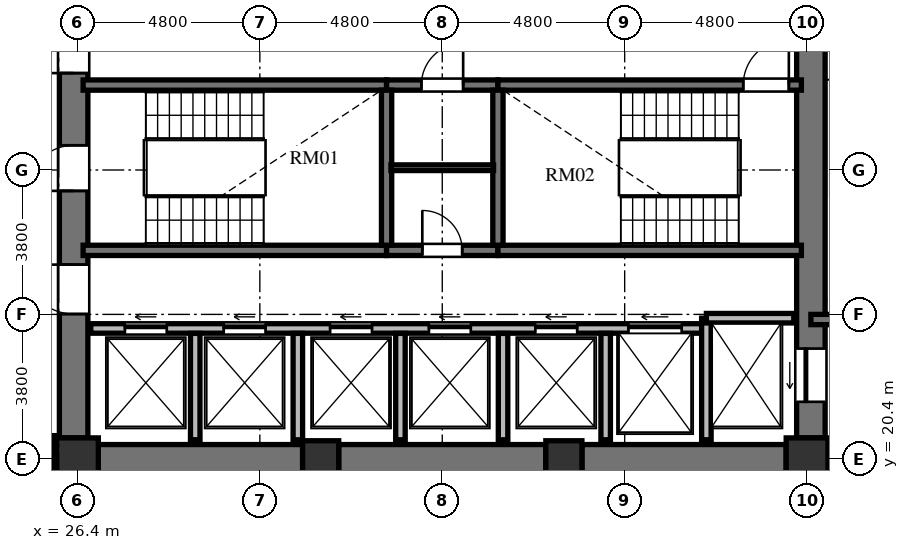
"""IFC4 building model, lengths in metres.
Left out: names, types, materials, properties, quantities, classifications, styles, units other than length and angle.
Written with IfcOpenShell. Run it as: python <this file> out.ifc"""

import sys

from ifc_helpers import new_model, si_unit, direction, frame, frame_2d, origin, origin_2d, place, context, subcontext, project, spatial, rectangle, extrude, element, fill, save


model = new_model("IFC4")
c1 = context("Model", 3, precision=1e-05, world=origin(), true_north=direction((0.0, 1.0)))
c2 = subcontext(c1, "Body", "Model", "MODEL_VIEW")
j1 = project(units=[si_unit("LENGTHUNIT", "METRE"), si_unit("PLANEANGLEUNIT", "RADIAN")], contexts=[c1])
p1 = place(None, origin())
s1 = spatial("IfcSite", under=j1, at=p1, CompositionType="ELEMENT")
p2 = place(p1, origin())
s2 = spatial("IfcBuilding", under=s1, at=p2, CompositionType="ELEMENT")
p3 = place(p2, frame((0.0, 0.0, 129.168)))
s3 = spatial("IfcBuildingStorey", under=s2, at=p3, CompositionType="ELEMENT", Elevation=129.168)
p4 = place(p3, frame((26.4, 20.4, 0.0), z_axis=(0.0, 0.0, 1.0), x_axis=(1.0, 0.0, 0.0)))
e1 = element("IfcColumn", 1, at=p4, inside=s3, PredefinedType="COLUMN", context=c2, shape_type="SweptSolid", body=[
    extrude(rectangle(XDim=1.1, YDim=1.1, at=origin_2d()), origin(), (0.0, 0.0, 1.0), 3.648),
])
for number, where, z_axis, x_axis in (
    (2, (32.8, 20.4, 0.0), (0.0, 0.0, 1.0), (1.0, 0.0, 0.0)),
    (3, (39.2, 20.4, 0.0), (0.0, 0.0, 1.0), (1.0, 0.0, 0.0)),
):
    element("IfcColumn", number, at=place(p3, frame(where, z_axis=z_axis, x_axis=x_axis)), inside=s3, PredefinedType="COLUMN", context=c2, shape_type="SweptSolid", body=[
        extrude(rectangle(XDim=0.95, YDim=0.95, at=origin_2d()), origin(), (0.0, 0.0, 1.0), 3.648),
    ])
p5 = place(p3, frame((45.6, 20.4, 0.0), z_axis=(0.0, 0.0, 1.0), x_axis=(1.0, 0.0, 0.0)))
e4 = element("IfcColumn", 4, at=p5, inside=s3, PredefinedType="COLUMN", context=c2, shape_type="SweptSolid", body=[
    extrude(rectangle(XDim=1.1, YDim=1.1, at=origin_2d()), origin(), (0.0, 0.0, 1.0), 3.648),
])
p6 = place(p3, frame((26.3, 20.95, 0.0), z_axis=(0.0, 0.0, 1.0), x_axis=(0.0, 1.0, 0.0)))
e5 = element("IfcWall", 5, at=p6, inside=s3, PredefinedType="SHEAR", context=c2, shape_type="SweptSolid", body=[
    extrude(rectangle(XDim=14.1, YDim=0.75, at=frame_2d((7.05, 0.0))), origin(), (0.0, 0.0, 1.0), 3.648),
])
p7 = place(p6, frame((6.5, 0.0, 0.0)))
e6 = element("IfcOpeningElement", 6, at=p7, cuts=e5, PredefinedType="OPENING", context=c2, shape_type="SweptSolid", body=[
    extrude(rectangle(XDim=1.2, YDim=2.15, at=frame_2d((0.6, 1.075))), frame((0.0, 0.385, 0.0), z_axis=(0.0, -1.0, 0.0), x_axis=(1.0, 0.0, 0.0)), (0.0, 0.0, 1.0), 0.77),
])
p8 = place(p6, frame((9.6, 0.0, 0.0)))
e7 = element("IfcOpeningElement", 7, at=p8, cuts=e5, PredefinedType="OPENING", context=c2, shape_type="SweptSolid", body=[
    extrude(rectangle(XDim=1.3, YDim=2.2, at=frame_2d((0.65, 1.1))), frame((0.0, 0.385, 0.0), z_axis=(0.0, -1.0, 0.0), x_axis=(1.0, 0.0, 0.0)), (0.0, 0.0, 1.0), 0.77),
])
p9 = place(p6, frame((3.26, 0.0, 0.0)))
e8 = element("IfcOpeningElement", 8, at=p9, cuts=e5, PredefinedType="OPENING", context=c2, shape_type="SweptSolid", body=[
    extrude(rectangle(XDim=1.3, YDim=2.2, at=frame_2d((0.65, 1.1))), frame((0.0, 0.385, 0.0), z_axis=(0.0, -1.0, 0.0), x_axis=(1.0, 0.0, 0.0)), (0.0, 0.0, 1.0), 0.77),
])
p10 = place(p3, frame((45.7, 20.95, 0.0), z_axis=(0.0, 0.0, 1.0), x_axis=(0.0, 1.0, 0.0)))
e9 = element("IfcWall", 9, at=p10, inside=s3, PredefinedType="SHEAR", context=c2, shape_type="SweptSolid", body=[
    extrude(rectangle(XDim=14.1, YDim=0.75, at=frame_2d((7.05, 0.0))), origin(), (0.0, 0.0, 1.0), 3.648),
])
p11 = place(p10, frame((11.75, 0.0, 0.0)))
e10 = element("IfcOpeningElement", 10, at=p11, cuts=e9, PredefinedType="OPENING", context=c2, shape_type="SweptSolid", body=[
    extrude(rectangle(XDim=1.4, YDim=2.3, at=frame_2d((0.7, 1.15))), frame((0.0, 0.385, 0.0), z_axis=(0.0, -1.0, 0.0), x_axis=(1.0, 0.0, 0.0)), (0.0, 0.0, 1.0), 0.77),
])
p12 = place(p10, frame((0.95, 0.0, 0.0)))
e11 = element("IfcOpeningElement", 11, at=p12, cuts=e9, PredefinedType="OPENING", context=c2, shape_type="SweptSolid", body=[
    extrude(rectangle(XDim=1.4, YDim=2.3, at=frame_2d((0.7, 1.15))), frame((0.0, 0.385, 0.0), z_axis=(0.0, -1.0, 0.0), x_axis=(1.0, 0.0, 0.0)), (0.0, 0.0, 1.0), 0.77),
])
p13 = place(p3, frame((26.95, 20.4, 0.0), z_axis=(0.0, 0.0, 1.0), x_axis=(1.0, 0.0, 0.0)))
e12 = element("IfcWall", 12, at=p13, inside=s3, PredefinedType="SHEAR", context=c2, shape_type="SweptSolid", body=[
    extrude(rectangle(XDim=5.375, YDim=0.75, at=frame_2d((2.688, 0.0))), origin(), (0.0, 0.0, 1.0), 3.648),
])
p14 = place(p3, frame((33.275, 20.4, 0.0), z_axis=(0.0, 0.0, 1.0), x_axis=(1.0, 0.0, 0.0)))
e13 = element("IfcWall", 13, at=p14, inside=s3, PredefinedType="SHEAR", context=c2, shape_type="SweptSolid", body=[
    extrude(rectangle(XDim=5.45, YDim=0.75, at=frame_2d((2.725, 0.0))), origin(), (0.0, 0.0, 1.0), 3.648),
])
p15 = place(p3, frame((39.675, 20.4, 0.0), z_axis=(0.0, 0.0, 1.0), x_axis=(1.0, 0.0, 0.0)))
e14 = element("IfcWall", 14, at=p15, inside=s3, PredefinedType="SHEAR", context=c2, shape_type="SweptSolid", body=[
    extrude(rectangle(XDim=5.375, YDim=0.75, at=frame_2d((2.688, 0.0))), origin(), (0.0, 0.0, 1.0), 3.648),
])
p16 = place(p3, frame((26.55, 30.235, 0.0), z_axis=(0.0, 0.0, 1.0), x_axis=(1.0, 0.0, 0.0)))
e15 = element("IfcWall", 15, at=p16, inside=s3, PredefinedType="SHEAR", context=c2, shape_type="SweptSolid", body=[
    extrude(rectangle(XDim=7.985, YDim=0.27, at=frame_2d((3.992, 0.0))), origin(), (0.0, 0.0, 1.0), 3.648),
])
p17 = place(p3, frame((34.535, 30.235, 0.0), z_axis=(0.0, 0.0, 1.0), x_axis=(1.0, 0.0, 0.0)))
e16 = element("IfcWall", 16, at=p17, inside=s3, PredefinedType="SHEAR", context=c2, shape_type="SweptSolid", body=[
    extrude(rectangle(XDim=2.93, YDim=0.27, at=frame_2d((1.465, 0.0))), origin(), (0.0, 0.0, 1.0), 3.648),
])
p18 = place(p17, frame((0.915, 0.0, 0.0)))
e17 = element("IfcOpeningElement", 17, at=p18, cuts=e16, PredefinedType="OPENING", context=c2, shape_type="SweptSolid", body=[
    extrude(rectangle(XDim=1.1, YDim=2.15, at=frame_2d((0.55, 1.075))), frame((0.0, 0.145, 0.0), z_axis=(0.0, -1.0, 0.0), x_axis=(1.0, 0.0, 0.0)), (0.0, 0.0, 1.0), 0.29),
])
p19 = place(p3, frame((37.465, 30.235, 0.0), z_axis=(0.0, 0.0, 1.0), x_axis=(1.0, 0.0, 0.0)))
e18 = element("IfcWall", 18, at=p19, inside=s3, PredefinedType="SHEAR", context=c2, shape_type="SweptSolid", body=[
    extrude(rectangle(XDim=7.985, YDim=0.27, at=frame_2d((3.992, 0.0))), origin(), (0.0, 0.0, 1.0), 3.648),
])
p20 = place(p19, frame((6.455, 0.0, 0.0)))
e19 = element("IfcOpeningElement", 19, at=p20, cuts=e18, PredefinedType="OPENING", context=c2, shape_type="SweptSolid", body=[
    extrude(rectangle(XDim=1.2, YDim=2.15, at=frame_2d((0.6, 1.075))), frame((0.0, 0.145, 0.0), z_axis=(0.0, -1.0, 0.0), x_axis=(1.0, 0.0, 0.0)), (0.0, 0.0, 1.0), 0.29),
])
p21 = place(p3, frame((26.55, 25.885, 0.0), z_axis=(0.0, 0.0, 1.0), x_axis=(1.0, 0.0, 0.0)))
e20 = element("IfcWall", 20, at=p21, inside=s3, PredefinedType="SHEAR", context=c2, shape_type="SweptSolid", body=[
    extrude(rectangle(XDim=7.985, YDim=0.27, at=frame_2d((3.992, 0.0))), origin(), (0.0, 0.0, 1.0), 3.648),
])
p22 = place(p3, frame((34.535, 25.885, 0.0), z_axis=(0.0, 0.0, 1.0), x_axis=(1.0, 0.0, 0.0)))
e21 = element("IfcWall", 21, at=p22, inside=s3, PredefinedType="SHEAR", context=c2, shape_type="SweptSolid", body=[
    extrude(rectangle(XDim=2.93, YDim=0.27, at=frame_2d((1.465, 0.0))), origin(), (0.0, 0.0, 1.0), 3.648),
])
p23 = place(p22, frame((0.94, 0.0, 0.0)))
e22 = element("IfcOpeningElement", 22, at=p23, cuts=e21, PredefinedType="OPENING", context=c2, shape_type="SweptSolid", body=[
    extrude(rectangle(XDim=1.05, YDim=2.15, at=frame_2d((0.525, 1.075))), frame((0.0, 0.145, 0.0), z_axis=(0.0, -1.0, 0.0), x_axis=(1.0, 0.0, 0.0)), (0.0, 0.0, 1.0), 0.29),
])
p24 = place(p3, frame((37.465, 25.885, 0.0), z_axis=(0.0, 0.0, 1.0), x_axis=(1.0, 0.0, 0.0)))
e23 = element("IfcWall", 23, at=p24, inside=s3, PredefinedType="SHEAR", context=c2, shape_type="SweptSolid", body=[
    extrude(rectangle(XDim=7.985, YDim=0.27, at=frame_2d((3.992, 0.0))), origin(), (0.0, 0.0, 1.0), 3.648),
])
for number, where, z_axis, x_axis in (
    (24, (34.535, 26.02, 0.0), (0.0, 0.0, 1.0), (0.0, 1.0, 0.0)),
    (25, (37.465, 26.02, 0.0), (0.0, 0.0, 1.0), (0.0, 1.0, 0.0)),
):
    element("IfcWall", number, at=place(p3, frame(where, z_axis=z_axis, x_axis=x_axis)), inside=s3, PredefinedType="SHEAR", context=c2, shape_type="SweptSolid", body=[
        extrude(rectangle(XDim=4.08, YDim=0.27, at=frame_2d((2.04, 0.0))), origin(), (0.0, 0.0, 1.0), 3.648),
    ])
p25 = place(p3, frame((34.65, 28.06, 0.0), z_axis=(0.0, 0.0, 1.0), x_axis=(1.0, 0.0, 0.0)))
e26 = element("IfcWall", 26, at=p25, inside=s3, PredefinedType="PARTITIONING", context=c2, shape_type="SweptSolid", body=[
    extrude(rectangle(XDim=2.7, YDim=0.15, at=frame_2d((1.35, 0.0))), origin(), (0.0, 0.0, 1.0), 3.198),
])
p26 = place(p3, frame((26.75, 23.83, 0.0), z_axis=(0.0, 0.0, 1.0), x_axis=(1.0, 0.0, 0.0)))
e27 = element("IfcWall", 27, at=p26, inside=s3, PredefinedType="SOLIDWALL", context=c2, shape_type="SweptSolid", body=[
    extrude(rectangle(XDim=16.2, YDim=0.25, at=frame_2d((8.1, 0.0))), origin(), (0.0, 0.0, 1.0), 3.198),
])
p27 = place(p26, frame((0.9, 0.0, 0.0)))
e28 = element("IfcOpeningElement", 28, at=p27, cuts=e27, PredefinedType="OPENING", context=c2, shape_type="SweptSolid", body=[
    extrude(rectangle(XDim=1.1, YDim=2.2, at=frame_2d((0.55, 1.1))), frame((0.0, 0.135, 0.0), z_axis=(0.0, -1.0, 0.0), x_axis=(1.0, 0.0, 0.0)), (0.0, 0.0, 1.0), 0.27),
])
p28 = place(p26, frame((3.5, 0.0, 0.0)))
e29 = element("IfcOpeningElement", 29, at=p28, cuts=e27, PredefinedType="OPENING", context=c2, shape_type="SweptSolid", body=[
    extrude(rectangle(XDim=1.1, YDim=2.2, at=frame_2d((0.55, 1.1))), frame((0.0, 0.135, 0.0), z_axis=(0.0, -1.0, 0.0), x_axis=(1.0, 0.0, 0.0)), (0.0, 0.0, 1.0), 0.27),
])
p29 = place(p26, frame((6.3, 0.0, 0.0)))
e30 = element("IfcOpeningElement", 30, at=p29, cuts=e27, PredefinedType="OPENING", context=c2, shape_type="SweptSolid", body=[
    extrude(rectangle(XDim=1.1, YDim=2.2, at=frame_2d((0.55, 1.1))), frame((0.0, 0.135, 0.0), z_axis=(0.0, -1.0, 0.0), x_axis=(1.0, 0.0, 0.0)), (0.0, 0.0, 1.0), 0.27),
])
p30 = place(p26, frame((8.9, 0.0, 0.0)))
e31 = element("IfcOpeningElement", 31, at=p30, cuts=e27, PredefinedType="OPENING", context=c2, shape_type="SweptSolid", body=[
    extrude(rectangle(XDim=1.1, YDim=2.2, at=frame_2d((0.55, 1.1))), frame((0.0, 0.135, 0.0), z_axis=(0.0, -1.0, 0.0), x_axis=(1.0, 0.0, 0.0)), (0.0, 0.0, 1.0), 0.27),
])
p31 = place(p26, frame((11.7, 0.0, 0.0)))
e32 = element("IfcOpeningElement", 32, at=p31, cuts=e27, PredefinedType="OPENING", context=c2, shape_type="SweptSolid", body=[
    extrude(rectangle(XDim=1.1, YDim=2.2, at=frame_2d((0.55, 1.1))), frame((0.0, 0.135, 0.0), z_axis=(0.0, -1.0, 0.0), x_axis=(1.0, 0.0, 0.0)), (0.0, 0.0, 1.0), 0.27),
])
p32 = place(p26, frame((14.15, 0.0, 0.0)))
e33 = element("IfcOpeningElement", 33, at=p32, cuts=e27, PredefinedType="OPENING", context=c2, shape_type="SweptSolid", body=[
    extrude(rectangle(XDim=1.4, YDim=2.3, at=frame_2d((0.7, 1.15))), frame((0.0, 0.135, 0.0), z_axis=(0.0, -1.0, 0.0), x_axis=(1.0, 0.0, 0.0)), (0.0, 0.0, 1.0), 0.27),
])
p33 = place(p3, frame((42.95, 20.9, 0.0), z_axis=(0.0, 0.0, 1.0), x_axis=(0.0, 1.0, 0.0)))
e34 = element("IfcWall", 34, at=p33, inside=s3, PredefinedType="SOLIDWALL", context=c2, shape_type="SweptSolid", body=[
    extrude(rectangle(XDim=3.2, YDim=0.25, at=frame_2d((1.6, 0.0))), origin(), (0.0, 0.0, 1.0), 3.198),
])
p34 = place(p3, frame((42.95, 24.1, 0.0), z_axis=(0.0, 0.0, 1.0), x_axis=(1.0, 0.0, 0.0)))
e35 = element("IfcWall", 35, at=p34, inside=s3, PredefinedType="SOLIDWALL", context=c2, shape_type="SweptSolid", body=[
    extrude(rectangle(XDim=2.3, YDim=0.25, at=frame_2d((1.15, 0.0))), origin(), (0.0, 0.0, 1.0), 3.198),
])
for number, where, z_axis, x_axis in (
    (36, (29.5, 20.9, 0.0), (0.0, 0.0, 1.0), (0.0, 1.0, 0.0)),
    (37, (32.2, 20.9, 0.0), (0.0, 0.0, 1.0), (0.0, 1.0, 0.0)),
    (38, (34.9, 20.9, 0.0), (0.0, 0.0, 1.0), (0.0, 1.0, 0.0)),
    (39, (37.6, 20.9, 0.0), (0.0, 0.0, 1.0), (0.0, 1.0, 0.0)),
    (40, (40.3, 20.9, 0.0), (0.0, 0.0, 1.0), (0.0, 1.0, 0.0)),
):
    element("IfcWall", number, at=place(p3, frame(where, z_axis=z_axis, x_axis=x_axis)), inside=s3, PredefinedType="SOLIDWALL", context=c2, shape_type="SweptSolid", body=[
        extrude(rectangle(XDim=2.8, YDim=0.25, at=frame_2d((1.4, 0.0))), origin(), (0.0, 0.0, 1.0), 3.198),
    ])
p35 = place(p3, frame((45.7, 24.065, 0.0), z_axis=(0.0, 0.0, 1.0), x_axis=(1.0, 0.0, 0.0)))
e41 = element("IfcWall", 41, at=p35, inside=s3, PredefinedType="SHEAR", context=c2, shape_type="SweptSolid", body=[
    extrude(rectangle(XDim=4.715, YDim=0.27, at=frame_2d((2.357, 0.0))), origin(), (0.0, 0.0, 1.0), 3.648),
])
p36 = place(p3, frame((45.7, 20.02, 0.0), z_axis=(0.0, 0.0, 1.0), x_axis=(1.0, 0.0, 0.0)))
e42 = element("IfcWall", 42, at=p36, inside=s3, PredefinedType="SOLIDWALL", context=c2, shape_type="SweptSolid", body=[
    extrude(rectangle(XDim=4.715, YDim=0.25, at=frame_2d((2.357, 0.0))), origin(), (0.0, 0.0, 1.0), 3.198),
])
p37 = place(p3, frame((25.83, 21.01, 0.0), z_axis=(0.0, 0.0, 1.0), x_axis=(0.0, -1.0, 0.0)))
e43 = element("IfcWall", 43, at=p37, inside=s3, PredefinedType="PARTITIONING", context=c2, shape_type="SweptSolid", body=[
    extrude(rectangle(XDim=1.22, YDim=0.18, at=frame_2d((0.61, 0.0))), origin(), (0.0, 0.0, 1.0), 3.198),
])
p38 = place(p7, origin())
e44 = element("IfcDoor", 44, at=p38, inside=s3, OperationType="SINGLE_SWING_LEFT", PredefinedType="DOOR", context=c2, shape_type="SweptSolid", body=[
    extrude(rectangle(XDim=1.2, YDim=2.15, at=frame_2d((0.6, 1.075))), frame((0.0, 0.025, 0.0), z_axis=(0.0, -1.0, 0.0), x_axis=(1.0, 0.0, 0.0)), (0.0, 0.0, 1.0), 0.05),
])
fill(e6, e44)
p39 = place(p20, origin())
e45 = element("IfcDoor", 45, at=p39, inside=s3, OperationType="SINGLE_SWING_RIGHT", PredefinedType="DOOR", context=c2, shape_type="SweptSolid", body=[
    extrude(rectangle(XDim=1.2, YDim=2.15, at=frame_2d((0.6, 1.075))), frame((0.0, 0.025, 0.0), z_axis=(0.0, -1.0, 0.0), x_axis=(1.0, 0.0, 0.0)), (0.0, 0.0, 1.0), 0.05),
])
fill(e19, e45)
p40 = place(p23, origin())
e46 = element("IfcDoor", 46, at=p40, inside=s3, OperationType="SINGLE_SWING_LEFT", PredefinedType="DOOR", context=c2, shape_type="SweptSolid", body=[
    extrude(rectangle(XDim=1.05, YDim=2.15, at=frame_2d((0.525, 1.075))), frame((0.0, 0.025, 0.0), z_axis=(0.0, -1.0, 0.0), x_axis=(1.0, 0.0, 0.0)), (0.0, 0.0, 1.0), 0.05),
])
fill(e22, e46)
p41 = place(p18, origin())
e47 = element("IfcDoor", 47, at=p41, inside=s3, OperationType="SINGLE_SWING_RIGHT", PredefinedType="DOOR", context=c2, shape_type="SweptSolid", body=[
    extrude(rectangle(XDim=1.1, YDim=2.15, at=frame_2d((0.55, 1.075))), frame((0.0, 0.025, 0.0), z_axis=(0.0, -1.0, 0.0), x_axis=(1.0, 0.0, 0.0)), (0.0, 0.0, 1.0), 0.05),
])
fill(e17, e47)
p42 = place(p8, origin())
e48 = element("IfcDoor", 48, at=p42, inside=s3, OperationType="SINGLE_SWING_LEFT", PredefinedType="DOOR", context=c2, shape_type="SweptSolid", body=[
    extrude(rectangle(XDim=1.3, YDim=2.2, at=frame_2d((0.65, 1.1))), frame((0.0, 0.025, 0.0), z_axis=(0.0, -1.0, 0.0), x_axis=(1.0, 0.0, 0.0)), (0.0, 0.0, 1.0), 0.05),
])
fill(e7, e48)
p43 = place(p9, origin())
e49 = element("IfcDoor", 49, at=p43, inside=s3, OperationType="SINGLE_SWING_RIGHT", PredefinedType="DOOR", context=c2, shape_type="SweptSolid", body=[
    extrude(rectangle(XDim=1.3, YDim=2.2, at=frame_2d((0.65, 1.1))), frame((0.0, 0.025, 0.0), z_axis=(0.0, -1.0, 0.0), x_axis=(1.0, 0.0, 0.0)), (0.0, 0.0, 1.0), 0.05),
])
fill(e8, e49)
p44 = place(p27, origin())
e50 = element("IfcDoor", 50, at=p44, inside=s3, OperationType="SLIDING_TO_LEFT", PredefinedType="DOOR", context=c2, shape_type="SweptSolid", body=[
    extrude(rectangle(XDim=1.1, YDim=2.2, at=frame_2d((0.55, 1.1))), frame((0.0, 0.025, 0.0), z_axis=(0.0, -1.0, 0.0), x_axis=(1.0, 0.0, 0.0)), (0.0, 0.0, 1.0), 0.05),
])
fill(e28, e50)
p45 = place(p28, origin())
e51 = element("IfcDoor", 51, at=p45, inside=s3, OperationType="SLIDING_TO_LEFT", PredefinedType="DOOR", context=c2, shape_type="SweptSolid", body=[
    extrude(rectangle(XDim=1.1, YDim=2.2, at=frame_2d((0.55, 1.1))), frame((0.0, 0.025, 0.0), z_axis=(0.0, -1.0, 0.0), x_axis=(1.0, 0.0, 0.0)), (0.0, 0.0, 1.0), 0.05),
])
fill(e29, e51)
p46 = place(p29, origin())
e52 = element("IfcDoor", 52, at=p46, inside=s3, OperationType="SLIDING_TO_LEFT", PredefinedType="DOOR", context=c2, shape_type="SweptSolid", body=[
    extrude(rectangle(XDim=1.1, YDim=2.2, at=frame_2d((0.55, 1.1))), frame((0.0, 0.025, 0.0), z_axis=(0.0, -1.0, 0.0), x_axis=(1.0, 0.0, 0.0)), (0.0, 0.0, 1.0), 0.05),
])
fill(e30, e52)
p47 = place(p30, origin())
e53 = element("IfcDoor", 53, at=p47, inside=s3, OperationType="SLIDING_TO_LEFT", PredefinedType="DOOR", context=c2, shape_type="SweptSolid", body=[
    extrude(rectangle(XDim=1.1, YDim=2.2, at=frame_2d((0.55, 1.1))), frame((0.0, 0.025, 0.0), z_axis=(0.0, -1.0, 0.0), x_axis=(1.0, 0.0, 0.0)), (0.0, 0.0, 1.0), 0.05),
])
fill(e31, e53)
p48 = place(p31, origin())
e54 = element("IfcDoor", 54, at=p48, inside=s3, OperationType="SLIDING_TO_LEFT", PredefinedType="DOOR", context=c2, shape_type="SweptSolid", body=[
    extrude(rectangle(XDim=1.1, YDim=2.2, at=frame_2d((0.55, 1.1))), frame((0.0, 0.025, 0.0), z_axis=(0.0, -1.0, 0.0), x_axis=(1.0, 0.0, 0.0)), (0.0, 0.0, 1.0), 0.05),
])
fill(e32, e54)
p49 = place(p12, origin())
e55 = element("IfcDoor", 55, at=p49, inside=s3, OperationType="SLIDING_TO_LEFT", PredefinedType="DOOR", context=c2, shape_type="SweptSolid", body=[
    extrude(rectangle(XDim=1.4, YDim=2.3, at=frame_2d((0.7, 1.15))), frame((0.0, 0.025, 0.0), z_axis=(0.0, -1.0, 0.0), x_axis=(1.0, 0.0, 0.0)), (0.0, 0.0, 1.0), 0.05),
])
fill(e11, e55)
p50 = place(p32, origin())
e56 = element("IfcDoor", 56, at=p50, inside=s3, OperationType="SLIDING_TO_LEFT", PredefinedType="DOOR", context=c2, shape_type="SweptSolid", body=[
    extrude(rectangle(XDim=1.4, YDim=2.3, at=frame_2d((0.7, 1.15))), frame((0.0, 0.025, 0.0), z_axis=(0.0, -1.0, 0.0), x_axis=(1.0, 0.0, 0.0)), (0.0, 0.0, 1.0), 0.05),
])
fill(e33, e56)
save(model, sys.argv[1])
